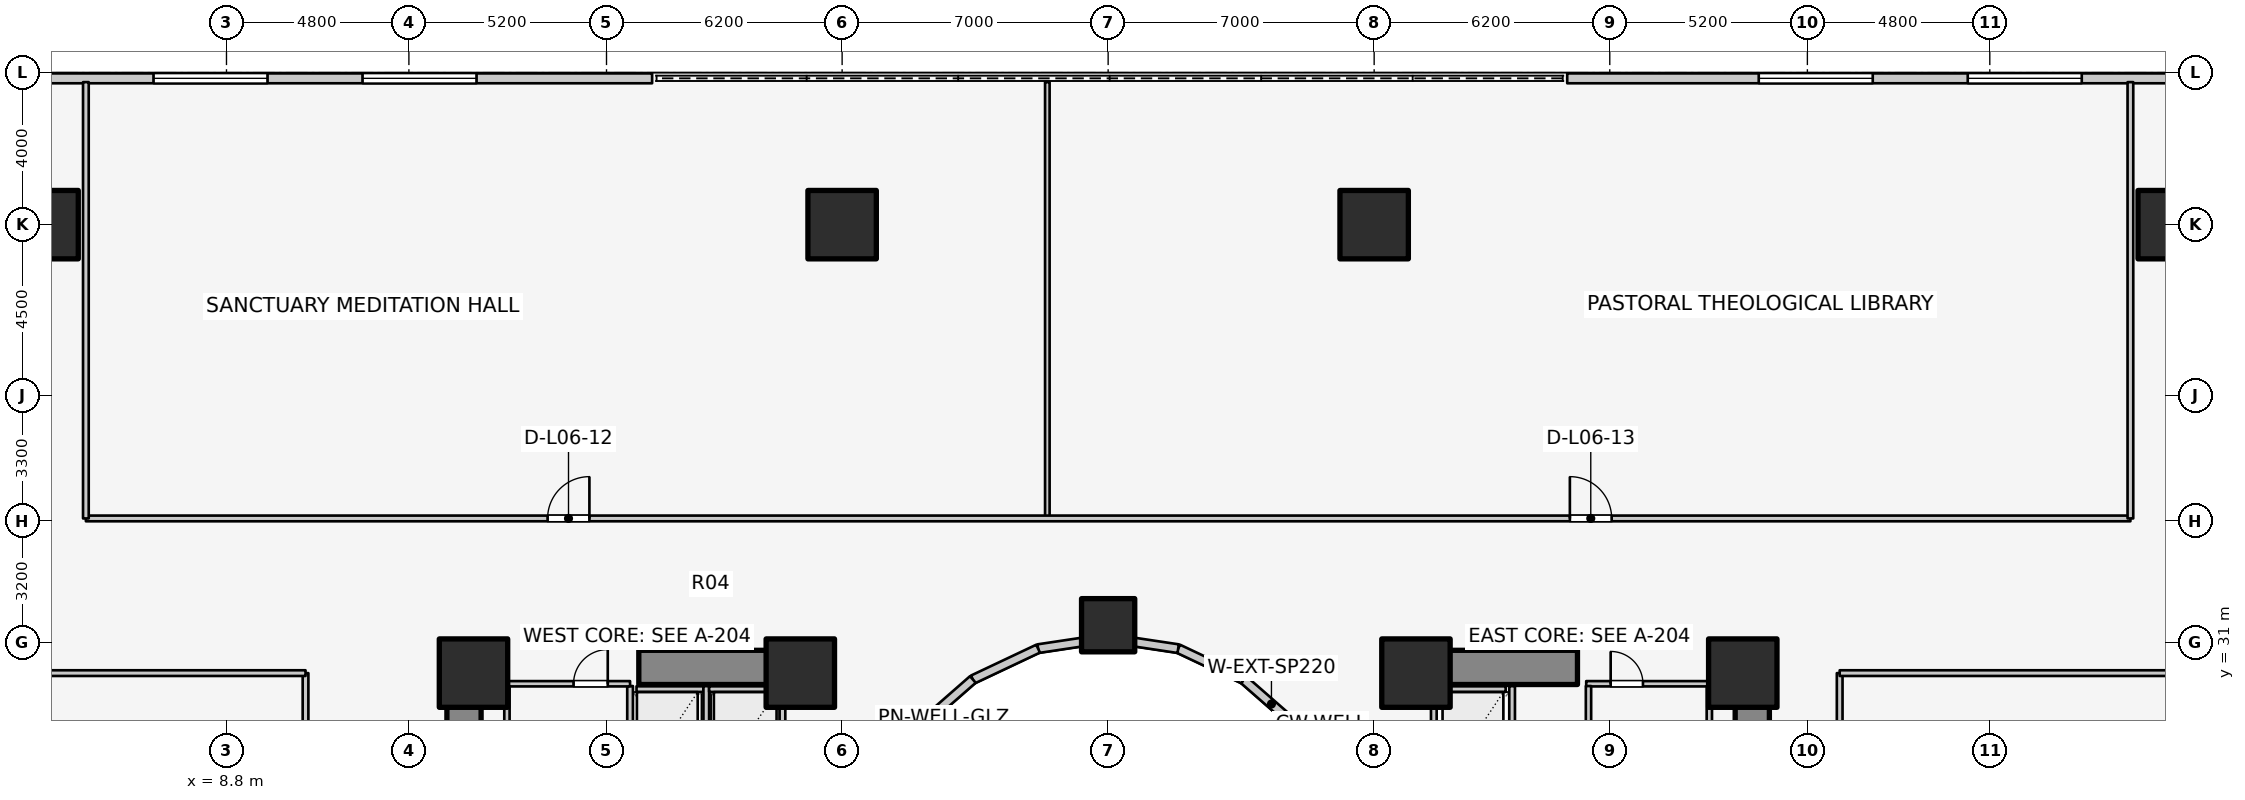
"""IFC4 building model, lengths in metres.
Left out: names, types, materials, properties, quantities, classifications, styles, units other than length and angle.
Written with IfcOpenShell. Run it as: python <this file> out.ifc"""

import sys

from ifc_helpers import new_model, si_unit, direction, frame, frame_2d, origin, origin_2d, place, context, subcontext, project, spatial, rectangle, extrude, element, fill, save


model = new_model("IFC4")
c1 = context("Model", 3, precision=1e-05, world=origin(), true_north=direction((0.0, 1.0)))
c2 = subcontext(c1, "Body", "Model", "MODEL_VIEW")
j1 = project(units=[si_unit("LENGTHUNIT", "METRE"), si_unit("PLANEANGLEUNIT", "RADIAN")], contexts=[c1])
p1 = place(None, origin())
s1 = spatial("IfcSite", under=j1, at=p1, CompositionType="ELEMENT")
p2 = place(p1, origin())
s2 = spatial("IfcBuilding", under=s1, at=p2, CompositionType="ELEMENT")
p3 = place(p2, frame((0.0, 0.0, 23.0)))
s3 = spatial("IfcBuildingStorey", under=s2, at=p3, CompositionType="ELEMENT", Elevation=23.0)
p4 = place(p3, frame((15.05, 17.05, 0.0), z_axis=(0.0, 0.0, 1.0), x_axis=(0.0, 1.0, 0.0)))
e1 = element("IfcWall", 1, at=p4, inside=s3, PredefinedType="SHEAR", context=c2, shape_type="SweptSolid", body=[
    extrude(rectangle(XDim=12.8, YDim=0.9, at=frame_2d((6.4, 0.0))), origin(), (0.0, 0.0, 1.0), 4.6),
])
p5 = place(p3, frame((19.65, 30.35, 0.0), z_axis=(0.0, 0.0, 1.0), x_axis=(1.0, 0.0, 0.0)))
e2 = element("IfcWall", 2, at=p5, inside=s3, PredefinedType="SHEAR", context=c2, shape_type="SweptSolid", body=[
    extrude(rectangle(XDim=4.5, YDim=0.9, at=frame_2d((2.25, 0.0))), origin(), (0.0, 0.0, 1.0), 4.6),
])
p6 = place(p3, frame((48.95, 17.05, 0.0), z_axis=(0.0, 0.0, 1.0), x_axis=(0.0, 1.0, 0.0)))
e3 = element("IfcWall", 3, at=p6, inside=s3, PredefinedType="SHEAR", context=c2, shape_type="SweptSolid", body=[
    extrude(rectangle(XDim=12.8, YDim=0.9, at=frame_2d((6.4, 0.0))), origin(), (0.0, 0.0, 1.0), 4.6),
])
p7 = place(p3, frame((39.85, 30.35, 0.0), z_axis=(0.0, 0.0, 1.0), x_axis=(1.0, 0.0, 0.0)))
e4 = element("IfcWall", 4, at=p7, inside=s3, PredefinedType="SHEAR", context=c2, shape_type="SweptSolid", body=[
    extrude(rectangle(XDim=4.5, YDim=0.9, at=frame_2d((2.25, 0.0))), origin(), (0.0, 0.0, 1.0), 4.6),
])
for number, where, z_axis, x_axis in (
    (5, (23.9, 30.2, 0.0), (0.0, 0.0, 1.0), (1.0, 0.0, 0.0)),
    (6, (15.3, 30.2, 0.0), (0.0, 0.0, 1.0), (1.0, 0.0, 0.0)),
    (7, (48.7, 30.2, 0.0), (0.0, 0.0, 1.0), (1.0, 0.0, 0.0)),
    (8, (40.1, 30.2, 0.0), (0.0, 0.0, 1.0), (1.0, 0.0, 0.0)),
    (9, (60.0, 42.0, 0.0), (0.0, 0.0, 1.0), (1.0, 0.0, 0.0)),
    (10, (39.0, 42.0, 0.0), (0.0, 0.0, 1.0), (1.0, 0.0, 0.0)),
    (11, (25.0, 42.0, 0.0), (0.0, 0.0, 1.0), (1.0, 0.0, 0.0)),
    (12, (4.0, 42.0, 0.0), (0.0, 0.0, 1.0), (1.0, 0.0, 0.0)),
):
    element("IfcColumn", number, at=place(p3, frame(where, z_axis=z_axis, x_axis=x_axis)), inside=s3, PredefinedType="COLUMN", context=c2, shape_type="SweptSolid", body=[
        extrude(rectangle(XDim=1.8, YDim=1.8, at=origin_2d()), origin(), (0.0, 0.0, 1.0), 4.6),
    ])
p8 = place(p3, frame((32.0, 31.46, 0.0), z_axis=(0.0, 0.0, 1.0), x_axis=(1.0, 0.0, 0.0)))
e13 = element("IfcColumn", 13, at=p8, inside=s3, PredefinedType="COLUMN", context=c2, shape_type="SweptSolid", body=[
    extrude(rectangle(XDim=1.4, YDim=1.4, at=origin_2d()), origin(), (0.0, 0.0, 1.0), 4.6),
])
p9 = place(p3, frame((63.72, 45.85, 0.0), z_axis=(0.0, 0.0, 1.0), x_axis=(-1.0, 0.0, 0.0)))
e14 = element("IfcWall", 14, at=p9, inside=s3, PredefinedType="STANDARD", context=c2, shape_type="SweptSolid", body=[
    extrude(rectangle(XDim=19.64, YDim=0.26, at=frame_2d((9.82, 0.0))), origin(), (0.0, 0.0, 1.0), 4.1),
])
p10 = place(p9, frame((6.1, 0.0, 0.9)))
e15 = element("IfcOpeningElement", 15, at=p10, cuts=e14, PredefinedType="OPENING", context=c2, shape_type="SweptSolid", body=[
    extrude(rectangle(XDim=3.0, YDim=2.4, at=frame_2d((1.5, 1.2))), frame((0.0, 0.14, 0.0), z_axis=(0.0, -1.0, 0.0), x_axis=(1.0, 0.0, 0.0)), (0.0, 0.0, 1.0), 0.28),
])
p11 = place(p9, frame((11.6, 0.0, 0.9)))
e16 = element("IfcOpeningElement", 16, at=p11, cuts=e14, PredefinedType="OPENING", context=c2, shape_type="SweptSolid", body=[
    extrude(rectangle(XDim=3.0, YDim=2.4, at=frame_2d((1.5, 1.2))), frame((0.0, 0.14, 0.0), z_axis=(0.0, -1.0, 0.0), x_axis=(1.0, 0.0, 0.0)), (0.0, 0.0, 1.0), 0.28),
])
p12 = place(p3, frame((20.0, 45.85, 0.0), z_axis=(0.0, 0.0, 1.0), x_axis=(-1.0, 0.0, 0.0)))
e17 = element("IfcWall", 17, at=p12, inside=s3, PredefinedType="STANDARD", context=c2, shape_type="SweptSolid", body=[
    extrude(rectangle(XDim=19.72, YDim=0.26, at=frame_2d((9.86, 0.0))), origin(), (0.0, 0.0, 1.0), 4.1),
])
p13 = place(p12, frame((4.62, 0.0, 0.9)))
e18 = element("IfcOpeningElement", 18, at=p13, cuts=e17, PredefinedType="OPENING", context=c2, shape_type="SweptSolid", body=[
    extrude(rectangle(XDim=3.0, YDim=2.4, at=frame_2d((1.5, 1.2))), frame((0.0, 0.14, 0.0), z_axis=(0.0, -1.0, 0.0), x_axis=(1.0, 0.0, 0.0)), (0.0, 0.0, 1.0), 0.28),
])
p14 = place(p12, frame((10.12, 0.0, 0.9)))
e19 = element("IfcOpeningElement", 19, at=p14, cuts=e17, PredefinedType="OPENING", context=c2, shape_type="SweptSolid", body=[
    extrude(rectangle(XDim=3.0, YDim=2.4, at=frame_2d((1.5, 1.2))), frame((0.0, 0.14, 0.0), z_axis=(0.0, -1.0, 0.0), x_axis=(1.0, 0.0, 0.0)), (0.0, 0.0, 1.0), 0.28),
])
p15 = place(p3, frame((37.035, 28.742, 0.0), z_axis=(0.0, 0.0, 1.0), x_axis=(-0.752576694707, 0.658504607869, 0.0)))
e20 = element("IfcWall", 20, at=p15, inside=s3, PredefinedType="STANDARD", context=c2, shape_type="SweptSolid", body=[
    extrude(rectangle(XDim=1.959, YDim=0.23, at=frame_2d((0.98, 0.0))), origin(), (0.0, 0.0, 1.0), 2.67),
])
p16 = place(p3, frame((35.56, 30.032, 0.0), z_axis=(0.0, 0.0, 1.0), x_axis=(-0.904179699603, 0.427152280606, 0.0)))
e21 = element("IfcWall", 21, at=p16, inside=s3, PredefinedType="STANDARD", context=c2, shape_type="SweptSolid", body=[
    extrude(rectangle(XDim=1.899, YDim=0.23, at=frame_2d((0.95, 0.0))), origin(), (0.0, 0.0, 1.0), 2.67),
])
for number, where, z_axis, x_axis in (
    (22, (33.843, 30.843, 0.0), (0.0, 0.0, 1.0), (-0.989, 0.149, 0.0)),
    (23, (32.0, 31.12, 0.0), (0.0, 0.0, 1.0), (-0.989, -0.149, 0.0)),
):
    element("IfcWall", number, at=place(p3, frame(where, z_axis=z_axis, x_axis=x_axis)), inside=s3, PredefinedType="STANDARD", context=c2, shape_type="SweptSolid", body=[
        extrude(rectangle(XDim=1.864, YDim=0.23, at=frame_2d((0.932, 0.0))), origin(), (0.0, 0.0, 1.0), 2.67),
    ])
p17 = place(p3, frame((30.157, 30.843, 0.0), z_axis=(0.0, 0.0, 1.0), x_axis=(-0.904179699603, -0.427152280606, 0.0)))
e24 = element("IfcWall", 24, at=p17, inside=s3, PredefinedType="STANDARD", context=c2, shape_type="SweptSolid", body=[
    extrude(rectangle(XDim=1.899, YDim=0.23, at=frame_2d((0.95, 0.0))), origin(), (0.0, 0.0, 1.0), 2.67),
])
p18 = place(p3, frame((28.44, 30.032, 0.0), z_axis=(0.0, 0.0, 1.0), x_axis=(-0.752576694707, -0.658504607869, 0.0)))
e25 = element("IfcWall", 25, at=p18, inside=s3, PredefinedType="STANDARD", context=c2, shape_type="SweptSolid", body=[
    extrude(rectangle(XDim=1.959, YDim=0.23, at=frame_2d((0.98, 0.0))), origin(), (0.0, 0.0, 1.0), 2.67),
])
p19 = place(p3, frame((19.59, 29.78, 0.0), z_axis=(0.0, 0.0, 1.0), x_axis=(1.0, 0.0, 0.0)))
e26 = element("IfcWall", 26, at=p19, inside=s3, PredefinedType="SOLIDWALL", context=c2, shape_type="SweptSolid", body=[
    extrude(rectangle(XDim=1.76, YDim=0.15, at=frame_2d((0.88, 0.0))), origin(), (0.0, 0.0, 1.0), 4.075),
])
for number, where, z_axis, x_axis in (
    (27, (19.42, 27.14, 0.0), (0.0, 0.0, 1.0), (0.0, 1.0, 0.0)),
    (28, (21.425, 27.14, 0.0), (0.0, 0.0, 1.0), (0.0, 1.0, 0.0)),
):
    element("IfcWall", number, at=place(p3, frame(where, z_axis=z_axis, x_axis=x_axis)), inside=s3, PredefinedType="SOLIDWALL", context=c2, shape_type="SweptSolid", body=[
        extrude(rectangle(XDim=2.72, YDim=0.15, at=frame_2d((1.36, 0.0))), origin(), (0.0, 0.0, 1.0), 4.075),
    ])
p20 = place(p3, frame((21.5, 29.78, 0.0), z_axis=(0.0, 0.0, 1.0), x_axis=(1.0, 0.0, 0.0)))
e29 = element("IfcWall", 29, at=p20, inside=s3, PredefinedType="SOLIDWALL", context=c2, shape_type="SweptSolid", body=[
    extrude(rectangle(XDim=1.76, YDim=0.15, at=frame_2d((0.88, 0.0))), origin(), (0.0, 0.0, 1.0), 4.075),
])
p21 = place(p3, frame((23.43, 27.14, 0.0), z_axis=(0.0, 0.0, 1.0), x_axis=(0.0, 1.0, 0.0)))
e30 = element("IfcWall", 30, at=p21, inside=s3, PredefinedType="SOLIDWALL", context=c2, shape_type="SweptSolid", body=[
    extrude(rectangle(XDim=2.72, YDim=0.15, at=frame_2d((1.36, 0.0))), origin(), (0.0, 0.0, 1.0), 4.075),
])
p22 = place(p3, frame((40.74, 29.78, 0.0), z_axis=(0.0, 0.0, 1.0), x_axis=(1.0, 0.0, 0.0)))
e31 = element("IfcWall", 31, at=p22, inside=s3, PredefinedType="SOLIDWALL", context=c2, shape_type="SweptSolid", body=[
    extrude(rectangle(XDim=1.72, YDim=0.15, at=frame_2d((0.86, 0.0))), origin(), (0.0, 0.0, 1.0), 4.075),
])
for number, where, z_axis, x_axis in (
    (32, (40.57, 27.14, 0.0), (0.0, 0.0, 1.0), (0.0, 1.0, 0.0)),
    (33, (42.63, 27.14, 0.0), (0.0, 0.0, 1.0), (0.0, 1.0, 0.0)),
):
    element("IfcWall", number, at=place(p3, frame(where, z_axis=z_axis, x_axis=x_axis)), inside=s3, PredefinedType="SOLIDWALL", context=c2, shape_type="SweptSolid", body=[
        extrude(rectangle(XDim=2.72, YDim=0.15, at=frame_2d((1.36, 0.0))), origin(), (0.0, 0.0, 1.0), 4.075),
    ])
p23 = place(p3, frame((30.4, 34.32, 0.0), z_axis=(0.0, 0.0, 1.0), x_axis=(0.0, 1.0, 0.0)))
e34 = element("IfcWall", 34, at=p23, inside=s3, PredefinedType="MOVABLE", context=c2, shape_type="SweptSolid", body=[
    extrude(rectangle(XDim=11.43, YDim=0.12, at=frame_2d((5.715, 0.0))), origin(), (0.0, 0.0, 1.0), 2.67),
])
p24 = place(p3, frame((5.1, 34.27, 0.0), z_axis=(0.0, 0.0, 1.0), x_axis=(1.0, 0.0, 0.0)))
e35 = element("IfcWall", 35, at=p24, inside=s3, PredefinedType="PARTITIONING", context=c2, shape_type="SweptSolid", body=[
    extrude(rectangle(XDim=53.8, YDim=0.15, at=frame_2d((26.9, 0.0))), origin(), (0.0, 0.0, 1.0), 2.67),
])
p25 = place(p24, frame((12.15, 0.0, 0.0)))
e36 = element("IfcOpeningElement", 36, at=p25, cuts=e35, PredefinedType="OPENING", context=c2, shape_type="SweptSolid", body=[
    extrude(rectangle(XDim=1.1, YDim=2.1, at=frame_2d((0.55, 1.05))), frame((0.0, 0.085, 0.0), z_axis=(0.0, -1.0, 0.0), x_axis=(1.0, 0.0, 0.0)), (0.0, 0.0, 1.0), 0.17),
])
p26 = place(p24, frame((39.05, 0.0, 0.0)))
e37 = element("IfcOpeningElement", 37, at=p26, cuts=e35, PredefinedType="OPENING", context=c2, shape_type="SweptSolid", body=[
    extrude(rectangle(XDim=1.1, YDim=2.1, at=frame_2d((0.55, 1.05))), frame((0.0, 0.085, 0.0), z_axis=(0.0, -1.0, 0.0), x_axis=(1.0, 0.0, 0.0)), (0.0, 0.0, 1.0), 0.17),
])
for number, where, z_axis, x_axis in (
    (38, (5.1, 34.27, 0.0), (0.0, 0.0, 1.0), (0.0, 1.0, 0.0)),
    (39, (58.9, 34.27, 0.0), (0.0, 0.0, 1.0), (0.0, 1.0, 0.0)),
):
    element("IfcWall", number, at=place(p3, frame(where, z_axis=z_axis, x_axis=x_axis)), inside=s3, PredefinedType="PARTITIONING", context=c2, shape_type="SweptSolid", body=[
        extrude(rectangle(XDim=11.48, YDim=0.15, at=frame_2d((5.74, 0.0))), origin(), (0.0, 0.0, 1.0), 2.67),
    ])
p27 = place(p3, frame((51.25, 16.75, 0.0), z_axis=(0.0, 0.0, 1.0), x_axis=(0.0, 1.0, 0.0)))
e40 = element("IfcWall", 40, at=p27, inside=s3, PredefinedType="PARTITIONING", context=c2, shape_type="SweptSolid", body=[
    extrude(rectangle(XDim=13.45, YDim=0.15, at=frame_2d((6.725, 0.0))), origin(), (0.0, 0.0, 1.0), 4.075),
])
p28 = place(p27, frame((6.175, 0.0, 0.0)))
e41 = element("IfcOpeningElement", 41, at=p28, cuts=e40, PredefinedType="OPENING", context=c2, shape_type="SweptSolid", body=[
    extrude(rectangle(XDim=1.1, YDim=2.1, at=frame_2d((0.55, 1.05))), frame((0.0, 0.085, 0.0), z_axis=(0.0, -1.0, 0.0), x_axis=(1.0, 0.0, 0.0)), (0.0, 0.0, 1.0), 0.17),
])
p29 = place(p3, frame((51.25, 30.2, 0.0), z_axis=(0.0, 0.0, 1.0), x_axis=(1.0, 0.0, 0.0)))
e42 = element("IfcWall", 42, at=p29, inside=s3, PredefinedType="PARTITIONING", context=c2, shape_type="SweptSolid", body=[
    extrude(rectangle(XDim=12.53, YDim=0.15, at=frame_2d((6.265, 0.0))), origin(), (0.0, 0.0, 1.0), 2.67),
])
p30 = place(p3, frame((10.88, 19.12, 0.0), z_axis=(0.0, 0.0, 1.0), x_axis=(0.0, 1.0, 0.0)))
e43 = element("IfcWall", 43, at=p30, inside=s3, PredefinedType="PARTITIONING", context=c2, shape_type="SweptSolid", body=[
    extrude(rectangle(XDim=11.08, YDim=0.15, at=frame_2d((5.54, 0.0))), origin(), (0.0, 0.0, 1.0), 3.62),
])
p31 = place(p3, frame((0.25, 30.2, 0.0), z_axis=(0.0, 0.0, 1.0), x_axis=(1.0, 0.0, 0.0)))
e44 = element("IfcWall", 44, at=p31, inside=s3, PredefinedType="PARTITIONING", context=c2, shape_type="SweptSolid", body=[
    extrude(rectangle(XDim=10.63, YDim=0.15, at=frame_2d((5.315, 0.0))), origin(), (0.0, 0.0, 1.0), 2.67),
])
p32 = place(p3, frame((16.12, 29.92, 0.0), z_axis=(0.0, 0.0, 1.0), x_axis=(1.0, 0.0, 0.0)))
e45 = element("IfcWall", 45, at=p32, inside=s3, PredefinedType="PLUMBINGWALL", context=c2, shape_type="SweptSolid", body=[
    extrude(rectangle(XDim=3.3, YDim=0.14, at=frame_2d((1.65, 0.0))), origin(), (0.0, 0.0, 1.0), 4.075),
])
p33 = place(p32, frame((1.813, 0.0, 0.0)))
e46 = element("IfcOpeningElement", 46, at=p33, cuts=e45, PredefinedType="OPENING", context=c2, shape_type="SweptSolid", body=[
    extrude(rectangle(XDim=0.9, YDim=2.1, at=frame_2d((0.45, 1.05))), frame((0.0, 0.08, 0.0), z_axis=(0.0, -1.0, 0.0), x_axis=(1.0, 0.0, 0.0)), (0.0, 0.0, 1.0), 0.16),
])
p34 = place(p3, frame((16.18, 25.98, 0.0), z_axis=(0.0, 0.0, 1.0), x_axis=(0.0, 1.0, 0.0)))
e47 = element("IfcWall", 47, at=p34, inside=s3, PredefinedType="PLUMBINGWALL", context=c2, shape_type="SweptSolid", body=[
    extrude(rectangle(XDim=3.88, YDim=0.14, at=frame_2d((1.94, 0.0))), origin(), (0.0, 0.0, 1.0), 4.075),
])
p35 = place(p3, frame((44.58, 29.92, 0.0), z_axis=(0.0, 0.0, 1.0), x_axis=(1.0, 0.0, 0.0)))
e48 = element("IfcWall", 48, at=p35, inside=s3, PredefinedType="PLUMBINGWALL", context=c2, shape_type="SweptSolid", body=[
    extrude(rectangle(XDim=3.3, YDim=0.14, at=frame_2d((1.65, 0.0))), origin(), (0.0, 0.0, 1.0), 4.075),
])
p36 = place(p35, frame((0.643, 0.0, 0.0)))
e49 = element("IfcOpeningElement", 49, at=p36, cuts=e48, PredefinedType="OPENING", context=c2, shape_type="SweptSolid", body=[
    extrude(rectangle(XDim=0.85, YDim=2.05, at=frame_2d((0.425, 1.025))), frame((0.0, 0.08, 0.0), z_axis=(0.0, -1.0, 0.0), x_axis=(1.0, 0.0, 0.0)), (0.0, 0.0, 1.0), 0.16),
])
for number, where, z_axis, x_axis in (
    (50, (44.64, 25.98, 0.0), (0.0, 0.0, 1.0), (0.0, 1.0, 0.0)),
    (51, (47.82, 25.98, 0.0), (0.0, 0.0, 1.0), (0.0, 1.0, 0.0)),
):
    element("IfcWall", number, at=place(p3, frame(where, z_axis=z_axis, x_axis=x_axis)), inside=s3, PredefinedType="PLUMBINGWALL", context=c2, shape_type="SweptSolid", body=[
        extrude(rectangle(XDim=3.88, YDim=0.14, at=frame_2d((1.94, 0.0))), origin(), (0.0, 0.0, 1.0), 4.075),
    ])
p37 = place(p10, origin())
e52 = element("IfcWindow", 52, at=p37, inside=s3, PartitioningType="SINGLE_PANEL", PredefinedType="WINDOW", context=c2, shape_type="SweptSolid", body=[
    extrude(rectangle(XDim=3.0, YDim=2.4, at=frame_2d((1.5, 1.2))), frame((0.0, 0.03, 0.0), z_axis=(0.0, -1.0, 0.0), x_axis=(1.0, 0.0, 0.0)), (0.0, 0.0, 1.0), 0.06),
])
fill(e15, e52)
p38 = place(p11, origin())
e53 = element("IfcWindow", 53, at=p38, inside=s3, PartitioningType="SINGLE_PANEL", PredefinedType="WINDOW", context=c2, shape_type="SweptSolid", body=[
    extrude(rectangle(XDim=3.0, YDim=2.4, at=frame_2d((1.5, 1.2))), frame((0.0, 0.03, 0.0), z_axis=(0.0, -1.0, 0.0), x_axis=(1.0, 0.0, 0.0)), (0.0, 0.0, 1.0), 0.06),
])
fill(e16, e53)
p39 = place(p13, origin())
e54 = element("IfcWindow", 54, at=p39, inside=s3, PartitioningType="SINGLE_PANEL", PredefinedType="WINDOW", context=c2, shape_type="SweptSolid", body=[
    extrude(rectangle(XDim=3.0, YDim=2.4, at=frame_2d((1.5, 1.2))), frame((0.0, 0.03, 0.0), z_axis=(0.0, -1.0, 0.0), x_axis=(1.0, 0.0, 0.0)), (0.0, 0.0, 1.0), 0.06),
])
fill(e18, e54)
p40 = place(p14, origin())
e55 = element("IfcWindow", 55, at=p40, inside=s3, PartitioningType="SINGLE_PANEL", PredefinedType="WINDOW", context=c2, shape_type="SweptSolid", body=[
    extrude(rectangle(XDim=3.0, YDim=2.4, at=frame_2d((1.5, 1.2))), frame((0.0, 0.03, 0.0), z_axis=(0.0, -1.0, 0.0), x_axis=(1.0, 0.0, 0.0)), (0.0, 0.0, 1.0), 0.06),
])
fill(e19, e55)
p41 = place(p25, origin())
e56 = element("IfcDoor", 56, at=p41, inside=s3, OperationType="SINGLE_SWING_RIGHT", PredefinedType="DOOR", context=c2, shape_type="SweptSolid", body=[
    extrude(rectangle(XDim=1.1, YDim=2.1, at=frame_2d((0.55, 1.05))), frame((0.0, 0.025, 0.0), z_axis=(0.0, -1.0, 0.0), x_axis=(1.0, 0.0, 0.0)), (0.0, 0.0, 1.0), 0.05),
])
fill(e36, e56)
p42 = place(p26, origin())
e57 = element("IfcDoor", 57, at=p42, inside=s3, OperationType="SINGLE_SWING_LEFT", PredefinedType="DOOR", context=c2, shape_type="SweptSolid", body=[
    extrude(rectangle(XDim=1.1, YDim=2.1, at=frame_2d((0.55, 1.05))), frame((0.0, 0.025, 0.0), z_axis=(0.0, -1.0, 0.0), x_axis=(1.0, 0.0, 0.0)), (0.0, 0.0, 1.0), 0.05),
])
fill(e37, e57)
p43 = place(p33, origin())
e58 = element("IfcDoor", 58, at=p43, inside=s3, OperationType="SINGLE_SWING_RIGHT", PredefinedType="DOOR", context=c2, shape_type="SweptSolid", body=[
    extrude(rectangle(XDim=0.9, YDim=2.1, at=frame_2d((0.45, 1.05))), frame((0.0, 0.025, 0.0), z_axis=(0.0, -1.0, 0.0), x_axis=(1.0, 0.0, 0.0)), (0.0, 0.0, 1.0), 0.05),
])
fill(e46, e58)
p44 = place(p36, origin())
e59 = element("IfcDoor", 59, at=p44, inside=s3, OperationType="SINGLE_SWING_LEFT", PredefinedType="DOOR", context=c2, shape_type="SweptSolid", body=[
    extrude(rectangle(XDim=0.85, YDim=2.05, at=frame_2d((0.425, 1.025))), frame((0.0, 0.025, 0.0), z_axis=(0.0, -1.0, 0.0), x_axis=(1.0, 0.0, 0.0)), (0.0, 0.0, 1.0), 0.05),
])
fill(e49, e59)
save(model, sys.argv[1])
